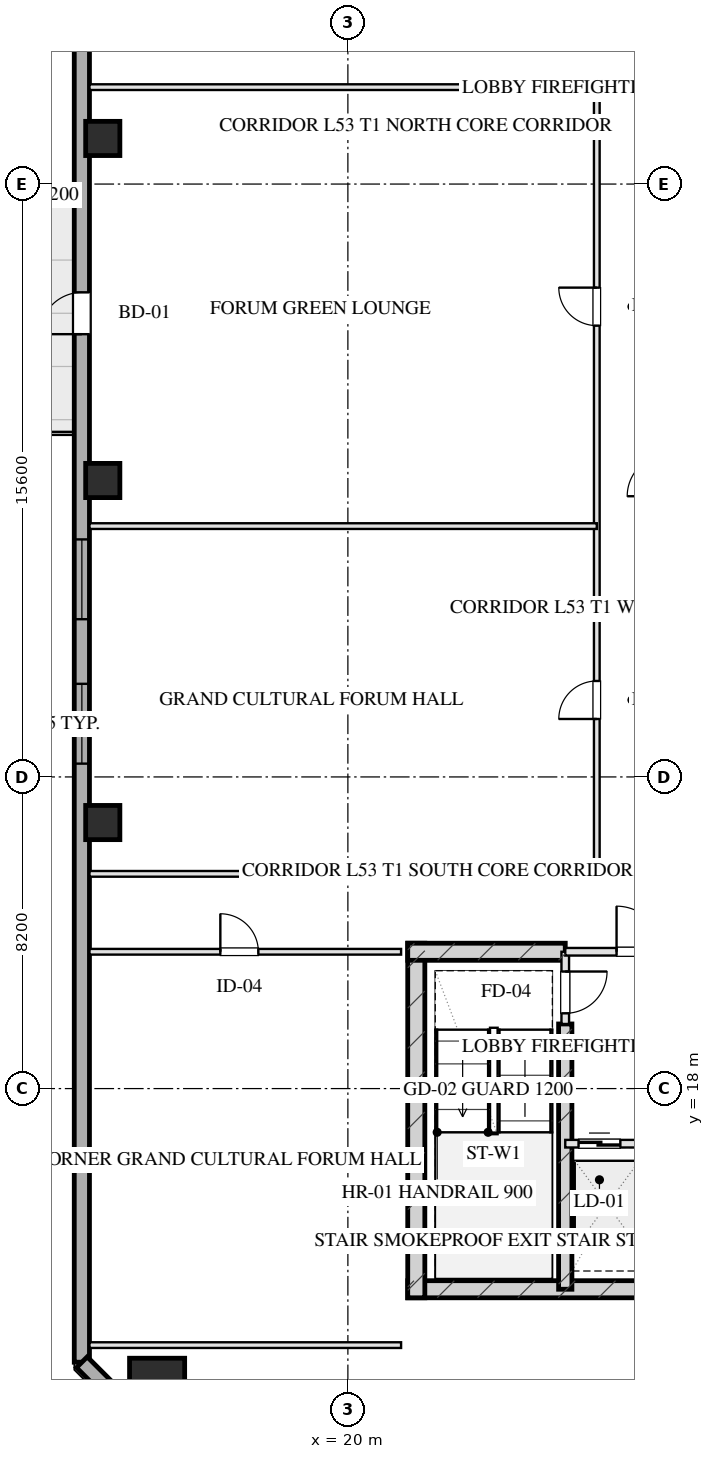
"""IFC4 building model, lengths in metres.
Left out: names, types, materials, properties, quantities, classifications, styles, units other than length and angle.
Written with IfcOpenShell. Run it as: python <this file> out.ifc"""

import sys

from ifc_helpers import new_model, si_unit, direction, frame, frame_2d, origin, origin_2d, place, context, subcontext, project, spatial, rectangle, hollow_rectangle, extrude, element, fill, save


model = new_model("IFC4")
c1 = context("Model", 3, precision=1e-05, world=origin(), true_north=direction((0.0, 1.0)))
c2 = subcontext(c1, "Body", "Model", "MODEL_VIEW")
j1 = project(units=[si_unit("LENGTHUNIT", "METRE"), si_unit("PLANEANGLEUNIT", "RADIAN")], contexts=[c1])
p1 = place(None, origin())
s1 = spatial("IfcSite", under=j1, at=p1, CompositionType="ELEMENT")
p2 = place(p1, origin())
s2 = spatial("IfcBuilding", under=s1, at=p2, CompositionType="ELEMENT")
p3 = place(p2, frame((0.0, 0.0, 198.95)))
s3 = spatial("IfcBuildingStorey", under=s2, at=p3, CompositionType="ELEMENT", Elevation=198.95)
p4 = place(p3, frame((21.575, 12.72, 0.0), z_axis=(0.0, 0.0, 1.0), x_axis=(1.0, 0.0, 0.0)))
e1 = element("IfcWall", 1, at=p4, inside=s3, PredefinedType="SHEAR", context=c2, shape_type="SweptSolid", body=[
    extrude(rectangle(XDim=16.85, YDim=0.45, at=frame_2d((8.425, 0.0))), origin(), (0.0, 0.0, 1.0), 3.45),
])
p5 = place(p3, frame((21.8, 21.825, 0.0), z_axis=(0.0, 0.0, 1.0), x_axis=(0.0, -1.0, 0.0)))
e2 = element("IfcWall", 2, at=p5, inside=s3, PredefinedType="SHEAR", context=c2, shape_type="SweptSolid", body=[
    extrude(rectangle(XDim=9.33, YDim=0.45, at=frame_2d((4.665, 0.0))), origin(), (0.0, 0.0, 1.0), 3.45),
])
p6 = place(p3, frame((25.72, 19.7, 0.0), z_axis=(0.0, 0.0, 1.0), x_axis=(0.0, -1.0, 0.0)))
e3 = element("IfcWall", 3, at=p6, inside=s3, PredefinedType="SHEAR", context=c2, shape_type="SweptSolid", body=[
    extrude(rectangle(XDim=6.98, YDim=0.35, at=frame_2d((3.49, 0.0))), origin(), (0.0, 0.0, 1.0), 3.45),
])
p7 = place(p3, frame((21.575, 21.6, 0.0), z_axis=(0.0, 0.0, 1.0), x_axis=(1.0, 0.0, 0.0)))
e4 = element("IfcWall", 4, at=p7, inside=s3, PredefinedType="SHEAR", context=c2, shape_type="SweptSolid", body=[
    extrude(rectangle(XDim=4.145, YDim=0.45, at=frame_2d((2.073, 0.0))), origin(), (0.0, 0.0, 1.0), 3.45),
])
p8 = place(p3, frame((14.98, 10.18, 0.0), z_axis=(0.0, 0.0, 1.0), x_axis=(1.0, 0.0, 0.0)))
e5 = element("IfcColumn", 5, at=p8, inside=s3, PredefinedType="COLUMN", context=c2, shape_type="SweptSolid", body=[
    extrude(hollow_rectangle(XDim=1.45, YDim=1.45, WallThickness=0.05, at=origin_2d()), origin(), (0.0, 0.0, 1.0), 3.451),
])
for number, where, z_axis, x_axis in (
    (6, (13.55, 25.0, 0.0), (0.0, 0.0, 1.0), (1.0, 0.0, 0.0)),
    (7, (13.55, 34.0, 0.0), (0.0, 0.0, 1.0), (1.0, 0.0, 0.0)),
    (8, (13.55, 43.0, 0.0), (0.0, 0.0, 1.0), (1.0, 0.0, 0.0)),
):
    element("IfcColumn", number, at=place(p3, frame(where, z_axis=z_axis, x_axis=x_axis)), inside=s3, PredefinedType="COLUMN", context=c2, shape_type="SweptSolid", body=[
        extrude(hollow_rectangle(XDim=0.9, YDim=0.9, WallThickness=0.032, at=origin_2d()), origin(), (0.0, 0.0, 1.0), 3.451),
    ])
p9 = place(p3, frame((13.0, 10.8, 0.0), z_axis=(0.0, 0.0, 1.0), x_axis=(0.0, 1.0, 0.0)))
e9 = element("IfcWall", 9, at=p9, inside=s3, PredefinedType="SOLIDWALL", context=c2, shape_type="SweptSolid", body=[
    extrude(rectangle(XDim=46.4, YDim=0.4, at=frame_2d((23.2, 0.0))), origin(), (0.0, 0.0, 1.0), 2.61),
])
p10 = place(p9, frame((15.75, 0.0, 0.75)))
e10 = element("IfcOpeningElement", 10, at=p10, cuts=e9, PredefinedType="OPENING", context=c2, shape_type="SweptSolid", body=[
    extrude(rectangle(XDim=2.1, YDim=1.46, at=frame_2d((1.05, 0.73))), frame((0.0, 0.21, 0.0), z_axis=(0.0, -1.0, 0.0), x_axis=(1.0, 0.0, 0.0)), (0.0, 0.0, 1.0), 0.42),
])
p11 = place(p9, frame((19.55, 0.0, 0.75)))
e11 = element("IfcOpeningElement", 11, at=p11, cuts=e9, PredefinedType="OPENING", context=c2, shape_type="SweptSolid", body=[
    extrude(rectangle(XDim=2.1, YDim=1.46, at=frame_2d((1.05, 0.73))), frame((0.0, 0.21, 0.0), z_axis=(0.0, -1.0, 0.0), x_axis=(1.0, 0.0, 0.0)), (0.0, 0.0, 1.0), 0.42),
])
p12 = place(p9, frame((27.05, 0.0, 0.0)))
e12 = element("IfcOpeningElement", 12, at=p12, cuts=e9, PredefinedType="OPENING", context=c2, shape_type="SweptSolid", body=[
    extrude(rectangle(XDim=1.1, YDim=2.15, at=frame_2d((0.55, 1.075))), frame((0.0, 0.21, 0.0), z_axis=(0.0, -1.0, 0.0), x_axis=(1.0, 0.0, 0.0)), (0.0, 0.0, 1.0), 0.42),
])
p13 = place(p3, frame((15.6, 8.2, 0.0), z_axis=(0.0, 0.0, 1.0), x_axis=(-0.707106781187, 0.707106781187, 0.0)))
e13 = element("IfcWall", 13, at=p13, inside=s3, PredefinedType="SOLIDWALL", context=c2, shape_type="SweptSolid", body=[
    extrude(rectangle(XDim=3.677, YDim=0.4, at=frame_2d((1.838, 0.0))), origin(), (0.0, 0.0, 1.0), 2.61),
])
p14 = place(p3, frame((25.72, 21.6, 0.0), z_axis=(0.0, 0.0, 1.0), x_axis=(0.0, -1.0, 0.0)))
e14 = element("IfcWall", 14, at=p14, inside=s3, PredefinedType="PARTITIONING", context=c2, shape_type="SweptSolid", body=[
    extrude(rectangle(XDim=1.9, YDim=0.2, at=frame_2d((0.95, 0.0))), origin(), (0.0, 0.0, 1.0), 3.175),
])
p15 = place(p14, frame((0.52, 0.0, 0.0)))
e15 = element("IfcOpeningElement", 15, at=p15, cuts=e14, PredefinedType="OPENING", context=c2, shape_type="SweptSolid", body=[
    extrude(rectangle(XDim=1.1, YDim=2.05, at=frame_2d((0.55, 1.025))), frame((0.0, 0.11, 0.0), z_axis=(0.0, -1.0, 0.0), x_axis=(1.0, 0.0, 0.0)), (0.0, 0.0, 1.0), 0.22),
])
p16 = place(p3, frame((25.72, 21.6, 0.0), z_axis=(0.0, 0.0, 1.0), x_axis=(1.0, 0.0, 0.0)))
e16 = element("IfcWall", 16, at=p16, inside=s3, PredefinedType="PARTITIONING", context=c2, shape_type="SweptSolid", body=[
    extrude(rectangle(XDim=3.83, YDim=0.2, at=frame_2d((1.915, 0.0))), origin(), (0.0, 0.0, 1.0), 3.175),
])
p17 = place(p16, frame((1.35, 0.0, 0.0)))
e17 = element("IfcOpeningElement", 17, at=p17, cuts=e16, PredefinedType="OPENING", context=c2, shape_type="SweptSolid", body=[
    extrude(rectangle(XDim=1.2, YDim=2.05, at=frame_2d((0.6, 1.025))), frame((0.0, 0.11, 0.0), z_axis=(0.0, -1.0, 0.0), x_axis=(1.0, 0.0, 0.0)), (0.0, 0.0, 1.0), 0.22),
])
p18 = place(p3, frame((25.72, 16.55, 0.0), z_axis=(0.0, 0.0, 1.0), x_axis=(1.0, 0.0, 0.0)))
e18 = element("IfcWall", 18, at=p18, inside=s3, PredefinedType="PARTITIONING", context=c2, shape_type="SweptSolid", body=[
    extrude(rectangle(XDim=2.1, YDim=0.2, at=frame_2d((1.05, 0.0))), origin(), (0.0, 0.0, 1.0), 3.175),
])
p19 = place(p18, frame((0.35, 0.0, 0.0)))
e19 = element("IfcOpeningElement", 19, at=p19, cuts=e18, PredefinedType="OPENING", context=c2, shape_type="SweptSolid", body=[
    extrude(rectangle(XDim=1.1, YDim=2.05, at=frame_2d((0.55, 1.025))), frame((0.0, 0.11, 0.0), z_axis=(0.0, -1.0, 0.0), x_axis=(1.0, 0.0, 0.0)), (0.0, 0.0, 1.0), 0.22),
])
p20 = place(p3, frame((13.2, 11.25, 0.0), z_axis=(0.0, 0.0, 1.0), x_axis=(1.0, 0.0, 0.0)))
e20 = element("IfcWall", 20, at=p20, inside=s3, PredefinedType="PARTITIONING", context=c2, shape_type="SweptSolid", body=[
    extrude(rectangle(XDim=8.2, YDim=0.15, at=frame_2d((4.1, 0.0))), origin(), (0.0, 0.0, 1.0), 3.175),
])
p21 = place(p3, frame((13.2, 21.6, 0.0), z_axis=(0.0, 0.0, 1.0), x_axis=(1.0, 0.0, 0.0)))
e21 = element("IfcWall", 21, at=p21, inside=s3, PredefinedType="PARTITIONING", context=c2, shape_type="SweptSolid", body=[
    extrude(rectangle(XDim=8.2, YDim=0.15, at=frame_2d((4.1, 0.0))), origin(), (0.0, 0.0, 1.0), 3.175),
])
p22 = place(p21, frame((3.444, 0.0, 0.0)))
e22 = element("IfcOpeningElement", 22, at=p22, cuts=e21, PredefinedType="OPENING", context=c2, shape_type="SweptSolid", body=[
    extrude(rectangle(XDim=1.0, YDim=2.05, at=frame_2d((0.5, 1.025))), frame((0.0, 0.085, 0.0), z_axis=(0.0, -1.0, 0.0), x_axis=(1.0, 0.0, 0.0)), (0.0, 0.0, 1.0), 0.17),
])
for number, where, z_axis, x_axis in (
    (23, (13.2, 23.65, 0.0), (0.0, 0.0, 1.0), (1.0, 0.0, 0.0)),
    (24, (13.2, 44.35, 0.0), (0.0, 0.0, 1.0), (1.0, 0.0, 0.0)),
):
    element("IfcWall", number, at=place(p3, frame(where, z_axis=z_axis, x_axis=x_axis)), inside=s3, PredefinedType="PARTITIONING", context=c2, shape_type="SweptSolid", body=[
        extrude(rectangle(XDim=13.35, YDim=0.15, at=frame_2d((6.675, 0.0))), origin(), (0.0, 0.0, 1.0), 3.175),
    ])
p23 = place(p3, frame((26.55, 23.65, 0.0), z_axis=(0.0, 0.0, 1.0), x_axis=(0.0, 1.0, 0.0)))
e25 = element("IfcWall", 25, at=p23, inside=s3, PredefinedType="PARTITIONING", context=c2, shape_type="SweptSolid", body=[
    extrude(rectangle(XDim=20.7, YDim=0.15, at=frame_2d((10.35, 0.0))), origin(), (0.0, 0.0, 1.0), 3.175),
])
p24 = place(p23, frame((4.075, 0.0, 0.0)))
e26 = element("IfcOpeningElement", 26, at=p24, cuts=e25, PredefinedType="OPENING", context=c2, shape_type="SweptSolid", body=[
    extrude(rectangle(XDim=1.0, YDim=2.05, at=frame_2d((0.5, 1.025))), frame((0.0, 0.085, 0.0), z_axis=(0.0, -1.0, 0.0), x_axis=(1.0, 0.0, 0.0)), (0.0, 0.0, 1.0), 0.17),
])
p25 = place(p23, frame((14.425, 0.0, 0.0)))
e27 = element("IfcOpeningElement", 27, at=p25, cuts=e25, PredefinedType="OPENING", context=c2, shape_type="SweptSolid", body=[
    extrude(rectangle(XDim=1.0, YDim=2.05, at=frame_2d((0.5, 1.025))), frame((0.0, 0.085, 0.0), z_axis=(0.0, -1.0, 0.0), x_axis=(1.0, 0.0, 0.0)), (0.0, 0.0, 1.0), 0.17),
])
p26 = place(p3, frame((13.2, 32.8, 0.0), z_axis=(0.0, 0.0, 1.0), x_axis=(1.0, 0.0, 0.0)))
e28 = element("IfcWall", 28, at=p26, inside=s3, PredefinedType="PARTITIONING", context=c2, shape_type="SweptSolid", body=[
    extrude(rectangle(XDim=13.35, YDim=0.15, at=frame_2d((6.675, 0.0))), origin(), (0.0, 0.0, 1.0), 3.175),
])
p27 = place(p10, origin())
e29 = element("IfcWindow", 29, at=p27, inside=s3, PartitioningType="TRIPLE_PANEL_VERTICAL", PredefinedType="WINDOW", context=c2, shape_type="SweptSolid", body=[
    extrude(rectangle(XDim=2.1, YDim=1.46, at=frame_2d((1.05, 0.73))), frame((0.0, 0.03, 0.0), z_axis=(0.0, -1.0, 0.0), x_axis=(1.0, 0.0, 0.0)), (0.0, 0.0, 1.0), 0.06),
])
fill(e10, e29)
p28 = place(p11, origin())
e30 = element("IfcWindow", 30, at=p28, inside=s3, PartitioningType="TRIPLE_PANEL_VERTICAL", PredefinedType="WINDOW", context=c2, shape_type="SweptSolid", body=[
    extrude(rectangle(XDim=2.1, YDim=1.46, at=frame_2d((1.05, 0.73))), frame((0.0, 0.03, 0.0), z_axis=(0.0, -1.0, 0.0), x_axis=(1.0, 0.0, 0.0)), (0.0, 0.0, 1.0), 0.06),
])
fill(e11, e30)
p29 = place(p12, origin())
e31 = element("IfcDoor", 31, at=p29, inside=s3, OperationType="SINGLE_SWING_LEFT", PredefinedType="DOOR", context=c2, shape_type="SweptSolid", body=[
    extrude(rectangle(XDim=1.1, YDim=2.15, at=frame_2d((0.55, 1.075))), frame((0.0, 0.025, 0.0), z_axis=(0.0, -1.0, 0.0), x_axis=(1.0, 0.0, 0.0)), (0.0, 0.0, 1.0), 0.05),
])
fill(e12, e31)
p30 = place(p15, origin())
e32 = element("IfcDoor", 32, at=p30, inside=s3, OperationType="SINGLE_SWING_LEFT", PredefinedType="DOOR", context=c2, shape_type="SweptSolid", body=[
    extrude(rectangle(XDim=1.1, YDim=2.05, at=frame_2d((0.55, 1.025))), frame((0.0, 0.025, 0.0), z_axis=(0.0, -1.0, 0.0), x_axis=(1.0, 0.0, 0.0)), (0.0, 0.0, 1.0), 0.05),
])
fill(e15, e32)
p31 = place(p17, origin())
e33 = element("IfcDoor", 33, at=p31, inside=s3, OperationType="SINGLE_SWING_LEFT", PredefinedType="DOOR", context=c2, shape_type="SweptSolid", body=[
    extrude(rectangle(XDim=1.2, YDim=2.05, at=frame_2d((0.6, 1.025))), frame((0.0, 0.025, 0.0), z_axis=(0.0, -1.0, 0.0), x_axis=(1.0, 0.0, 0.0)), (0.0, 0.0, 1.0), 0.05),
])
fill(e17, e33)
p32 = place(p19, origin())
e34 = element("IfcDoor", 34, at=p32, inside=s3, OperationType="DOUBLE_DOOR_SLIDING", PredefinedType="DOOR", context=c2, shape_type="SweptSolid", body=[
    extrude(rectangle(XDim=1.1, YDim=2.05, at=frame_2d((0.55, 1.025))), frame((0.0, 0.025, 0.0), z_axis=(0.0, -1.0, 0.0), x_axis=(1.0, 0.0, 0.0)), (0.0, 0.0, 1.0), 0.05),
])
fill(e19, e34)
p33 = place(p22, origin())
e35 = element("IfcDoor", 35, at=p33, inside=s3, OperationType="SINGLE_SWING_LEFT", PredefinedType="DOOR", context=c2, shape_type="SweptSolid", body=[
    extrude(rectangle(XDim=1.0, YDim=2.05, at=frame_2d((0.5, 1.025))), frame((0.0, 0.025, 0.0), z_axis=(0.0, -1.0, 0.0), x_axis=(1.0, 0.0, 0.0)), (0.0, 0.0, 1.0), 0.05),
])
fill(e22, e35)
p34 = place(p24, origin())
e36 = element("IfcDoor", 36, at=p34, inside=s3, OperationType="SINGLE_SWING_LEFT", PredefinedType="DOOR", context=c2, shape_type="SweptSolid", body=[
    extrude(rectangle(XDim=1.0, YDim=2.05, at=frame_2d((0.5, 1.025))), frame((0.0, 0.025, 0.0), z_axis=(0.0, -1.0, 0.0), x_axis=(1.0, 0.0, 0.0)), (0.0, 0.0, 1.0), 0.05),
])
fill(e26, e36)
p35 = place(p25, origin())
e37 = element("IfcDoor", 37, at=p35, inside=s3, OperationType="SINGLE_SWING_RIGHT", PredefinedType="DOOR", context=c2, shape_type="SweptSolid", body=[
    extrude(rectangle(XDim=1.0, YDim=2.05, at=frame_2d((0.5, 1.025))), frame((0.0, 0.025, 0.0), z_axis=(0.0, -1.0, 0.0), x_axis=(1.0, 0.0, 0.0)), (0.0, 0.0, 1.0), 0.05),
])
fill(e27, e37)
save(model, sys.argv[1])
